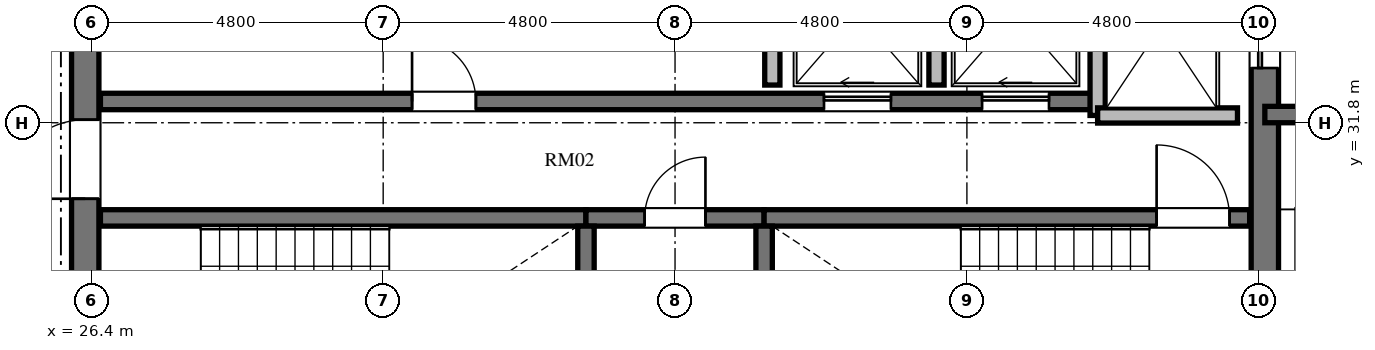
"""IFC4 building model, lengths in metres.
Left out: names, types, materials, properties, quantities, classifications, styles, units other than length and angle.
Written with IfcOpenShell. Run it as: python <this file> out.ifc"""

import sys

from ifc_helpers import new_model, si_unit, direction, frame, frame_2d, origin, place, context, subcontext, project, spatial, rectangle, extrude, element, fill, save


model = new_model("IFC4")
c1 = context("Model", 3, precision=1e-05, world=origin(), true_north=direction((0.0, 1.0)))
c2 = subcontext(c1, "Body", "Model", "MODEL_VIEW")
j1 = project(units=[si_unit("LENGTHUNIT", "METRE"), si_unit("PLANEANGLEUNIT", "RADIAN")], contexts=[c1])
p1 = place(None, origin())
s1 = spatial("IfcSite", under=j1, at=p1, CompositionType="ELEMENT")
p2 = place(p1, origin())
s2 = spatial("IfcBuilding", under=s1, at=p2, CompositionType="ELEMENT")
p3 = place(p2, frame((0.0, 0.0, 291.504)))
s3 = spatial("IfcBuildingStorey", under=s2, at=p3, CompositionType="ELEMENT", Elevation=291.504)
p4 = place(p3, frame((26.3, 20.95, 0.0), z_axis=(0.0, 0.0, 1.0), x_axis=(0.0, 1.0, 0.0)))
e1 = element("IfcWall", 1, at=p4, inside=s3, PredefinedType="SHEAR", context=c2, shape_type="SweptSolid", body=[
    extrude(rectangle(XDim=14.1, YDim=0.45, at=frame_2d((7.05, 0.0))), origin(), (0.0, 0.0, 1.0), 3.648),
])
p5 = place(p4, frame((6.5, 0.0, 0.0)))
e2 = element("IfcOpeningElement", 2, at=p5, cuts=e1, PredefinedType="OPENING", context=c2, shape_type="SweptSolid", body=[
    extrude(rectangle(XDim=1.2, YDim=2.15, at=frame_2d((0.6, 1.075))), frame((0.0, 0.235, 0.0), z_axis=(0.0, -1.0, 0.0), x_axis=(1.0, 0.0, 0.0)), (0.0, 0.0, 1.0), 0.47),
])
p6 = place(p4, frame((9.6, 0.0, 0.0)))
e3 = element("IfcOpeningElement", 3, at=p6, cuts=e1, PredefinedType="OPENING", context=c2, shape_type="SweptSolid", body=[
    extrude(rectangle(XDim=1.3, YDim=2.2, at=frame_2d((0.65, 1.1))), frame((0.0, 0.235, 0.0), z_axis=(0.0, -1.0, 0.0), x_axis=(1.0, 0.0, 0.0)), (0.0, 0.0, 1.0), 0.47),
])
p7 = place(p4, frame((3.26, 0.0, 0.0)))
e4 = element("IfcOpeningElement", 4, at=p7, cuts=e1, PredefinedType="OPENING", context=c2, shape_type="SweptSolid", body=[
    extrude(rectangle(XDim=1.3, YDim=2.2, at=frame_2d((0.65, 1.1))), frame((0.0, 0.235, 0.0), z_axis=(0.0, -1.0, 0.0), x_axis=(1.0, 0.0, 0.0)), (0.0, 0.0, 1.0), 0.47),
])
p8 = place(p3, frame((45.7, 20.95, 0.0), z_axis=(0.0, 0.0, 1.0), x_axis=(0.0, 1.0, 0.0)))
e5 = element("IfcWall", 5, at=p8, inside=s3, PredefinedType="SHEAR", context=c2, shape_type="SweptSolid", body=[
    extrude(rectangle(XDim=14.1, YDim=0.45, at=frame_2d((7.05, 0.0))), origin(), (0.0, 0.0, 1.0), 3.648),
])
p9 = place(p8, frame((11.75, 0.0, 0.0)))
e6 = element("IfcOpeningElement", 6, at=p9, cuts=e5, PredefinedType="OPENING", context=c2, shape_type="SweptSolid", body=[
    extrude(rectangle(XDim=1.4, YDim=2.3, at=frame_2d((0.7, 1.15))), frame((0.0, 0.235, 0.0), z_axis=(0.0, -1.0, 0.0), x_axis=(1.0, 0.0, 0.0)), (0.0, 0.0, 1.0), 0.47),
])
p10 = place(p8, frame((0.95, 0.0, 0.0)))
e7 = element("IfcOpeningElement", 7, at=p10, cuts=e5, PredefinedType="OPENING", context=c2, shape_type="SweptSolid", body=[
    extrude(rectangle(XDim=1.4, YDim=2.3, at=frame_2d((0.7, 1.15))), frame((0.0, 0.235, 0.0), z_axis=(0.0, -1.0, 0.0), x_axis=(1.0, 0.0, 0.0)), (0.0, 0.0, 1.0), 0.47),
])
p11 = place(p3, frame((26.55, 30.235, 0.0), z_axis=(0.0, 0.0, 1.0), x_axis=(1.0, 0.0, 0.0)))
e8 = element("IfcWall", 8, at=p11, inside=s3, PredefinedType="SHEAR", context=c2, shape_type="SweptSolid", body=[
    extrude(rectangle(XDim=7.985, YDim=0.27, at=frame_2d((3.992, 0.0))), origin(), (0.0, 0.0, 1.0), 3.648),
])
p12 = place(p3, frame((34.535, 30.235, 0.0), z_axis=(0.0, 0.0, 1.0), x_axis=(1.0, 0.0, 0.0)))
e9 = element("IfcWall", 9, at=p12, inside=s3, PredefinedType="SHEAR", context=c2, shape_type="SweptSolid", body=[
    extrude(rectangle(XDim=2.93, YDim=0.27, at=frame_2d((1.465, 0.0))), origin(), (0.0, 0.0, 1.0), 3.648),
])
p13 = place(p12, frame((0.965, 0.0, 0.0)))
e10 = element("IfcOpeningElement", 10, at=p13, cuts=e9, PredefinedType="OPENING", context=c2, shape_type="SweptSolid", body=[
    extrude(rectangle(XDim=1.0, YDim=2.1, at=frame_2d((0.5, 1.05))), frame((0.0, 0.145, 0.0), z_axis=(0.0, -1.0, 0.0), x_axis=(1.0, 0.0, 0.0)), (0.0, 0.0, 1.0), 0.29),
])
p14 = place(p3, frame((37.465, 30.235, 0.0), z_axis=(0.0, 0.0, 1.0), x_axis=(1.0, 0.0, 0.0)))
e11 = element("IfcWall", 11, at=p14, inside=s3, PredefinedType="SHEAR", context=c2, shape_type="SweptSolid", body=[
    extrude(rectangle(XDim=7.985, YDim=0.27, at=frame_2d((3.992, 0.0))), origin(), (0.0, 0.0, 1.0), 3.648),
])
p15 = place(p14, frame((6.455, 0.0, 0.0)))
e12 = element("IfcOpeningElement", 12, at=p15, cuts=e11, PredefinedType="OPENING", context=c2, shape_type="SweptSolid", body=[
    extrude(rectangle(XDim=1.2, YDim=2.15, at=frame_2d((0.6, 1.075))), frame((0.0, 0.145, 0.0), z_axis=(0.0, -1.0, 0.0), x_axis=(1.0, 0.0, 0.0)), (0.0, 0.0, 1.0), 0.29),
])
for number, where, z_axis, x_axis in (
    (13, (34.535, 26.02, 0.0), (0.0, 0.0, 1.0), (0.0, 1.0, 0.0)),
    (14, (37.465, 26.02, 0.0), (0.0, 0.0, 1.0), (0.0, 1.0, 0.0)),
):
    element("IfcWall", number, at=place(p3, frame(where, z_axis=z_axis, x_axis=x_axis)), inside=s3, PredefinedType="SHEAR", context=c2, shape_type="SweptSolid", body=[
        extrude(rectangle(XDim=4.08, YDim=0.27, at=frame_2d((2.04, 0.0))), origin(), (0.0, 0.0, 1.0), 3.648),
    ])
p16 = place(p3, frame((26.55, 32.15, 0.0), z_axis=(0.0, 0.0, 1.0), x_axis=(1.0, 0.0, 0.0)))
e15 = element("IfcWall", 15, at=p16, inside=s3, PredefinedType="SHEAR", context=c2, shape_type="SweptSolid", body=[
    extrude(rectangle(XDim=16.4, YDim=0.27, at=frame_2d((8.2, 0.0))), origin(), (0.0, 0.0, 1.0), 3.648),
])
p17 = place(p16, frame((5.125, 0.0, 0.0)))
e16 = element("IfcOpeningElement", 16, at=p17, cuts=e15, PredefinedType="OPENING", context=c2, shape_type="SweptSolid", body=[
    extrude(rectangle(XDim=1.05, YDim=2.15, at=frame_2d((0.525, 1.075))), frame((0.0, 0.145, 0.0), z_axis=(0.0, -1.0, 0.0), x_axis=(1.0, 0.0, 0.0)), (0.0, 0.0, 1.0), 0.29),
])
p18 = place(p16, frame((11.9, 0.0, 0.0)))
e17 = element("IfcOpeningElement", 17, at=p18, cuts=e15, PredefinedType="OPENING", context=c2, shape_type="SweptSolid", body=[
    extrude(rectangle(XDim=1.1, YDim=2.2, at=frame_2d((0.55, 1.1))), frame((0.0, 0.145, 0.0), z_axis=(0.0, -1.0, 0.0), x_axis=(1.0, 0.0, 0.0)), (0.0, 0.0, 1.0), 0.29),
])
p19 = place(p16, frame((14.5, 0.0, 0.0)))
e18 = element("IfcOpeningElement", 18, at=p19, cuts=e15, PredefinedType="OPENING", context=c2, shape_type="SweptSolid", body=[
    extrude(rectangle(XDim=1.1, YDim=2.2, at=frame_2d((0.55, 1.1))), frame((0.0, 0.145, 0.0), z_axis=(0.0, -1.0, 0.0), x_axis=(1.0, 0.0, 0.0)), (0.0, 0.0, 1.0), 0.29),
])
p20 = place(p3, frame((42.95, 31.92, 0.0), z_axis=(0.0, 0.0, 1.0), x_axis=(0.0, 1.0, 0.0)))
e19 = element("IfcWall", 19, at=p20, inside=s3, PredefinedType="SOLIDWALL", context=c2, shape_type="SweptSolid", body=[
    extrude(rectangle(XDim=3.18, YDim=0.25, at=frame_2d((1.59, 0.0))), origin(), (0.0, 0.0, 1.0), 3.448),
])
p21 = place(p3, frame((42.95, 31.92, 0.0), z_axis=(0.0, 0.0, 1.0), x_axis=(1.0, 0.0, 0.0)))
e20 = element("IfcWall", 20, at=p21, inside=s3, PredefinedType="SOLIDWALL", context=c2, shape_type="SweptSolid", body=[
    extrude(rectangle(XDim=2.3, YDim=0.25, at=frame_2d((1.15, 0.0))), origin(), (0.0, 0.0, 1.0), 3.448),
])
for number, where, z_axis, x_axis in (
    (21, (37.6, 32.42, 0.0), (0.0, 0.0, 1.0), (0.0, 1.0, 0.0)),
    (22, (40.3, 32.42, 0.0), (0.0, 0.0, 1.0), (0.0, 1.0, 0.0)),
):
    element("IfcWall", number, at=place(p3, frame(where, z_axis=z_axis, x_axis=x_axis)), inside=s3, PredefinedType="SOLIDWALL", context=c2, shape_type="SweptSolid", body=[
        extrude(rectangle(XDim=2.68, YDim=0.25, at=frame_2d((1.34, 0.0))), origin(), (0.0, 0.0, 1.0), 3.448),
    ])
p22 = place(p3, frame((45.7, 31.935, 0.0), z_axis=(0.0, 0.0, 1.0), x_axis=(1.0, 0.0, 0.0)))
e23 = element("IfcWall", 23, at=p22, inside=s3, PredefinedType="SHEAR", context=c2, shape_type="SweptSolid", body=[
    extrude(rectangle(XDim=4.715, YDim=0.27, at=frame_2d((2.357, 0.0))), origin(), (0.0, 0.0, 1.0), 3.648),
])
p23 = place(p15, origin())
e24 = element("IfcDoor", 24, at=p23, inside=s3, OperationType="SINGLE_SWING_LEFT", PredefinedType="DOOR", context=c2, shape_type="SweptSolid", body=[
    extrude(rectangle(XDim=1.2, YDim=2.15, at=frame_2d((0.6, 1.075))), frame((0.0, 0.025, 0.0), z_axis=(0.0, -1.0, 0.0), x_axis=(1.0, 0.0, 0.0)), (0.0, 0.0, 1.0), 0.05),
])
fill(e12, e24)
p24 = place(p13, origin())
e25 = element("IfcDoor", 25, at=p24, inside=s3, OperationType="SINGLE_SWING_RIGHT", PredefinedType="DOOR", context=c2, shape_type="SweptSolid", body=[
    extrude(rectangle(XDim=1.0, YDim=2.1, at=frame_2d((0.5, 1.05))), frame((0.0, 0.025, 0.0), z_axis=(0.0, -1.0, 0.0), x_axis=(1.0, 0.0, 0.0)), (0.0, 0.0, 1.0), 0.05),
])
fill(e10, e25)
p25 = place(p6, origin())
e26 = element("IfcDoor", 26, at=p25, inside=s3, OperationType="SINGLE_SWING_LEFT", PredefinedType="DOOR", context=c2, shape_type="SweptSolid", body=[
    extrude(rectangle(XDim=1.3, YDim=2.2, at=frame_2d((0.65, 1.1))), frame((0.0, 0.025, 0.0), z_axis=(0.0, -1.0, 0.0), x_axis=(1.0, 0.0, 0.0)), (0.0, 0.0, 1.0), 0.05),
])
fill(e3, e26)
p26 = place(p17, origin())
e27 = element("IfcDoor", 27, at=p26, inside=s3, OperationType="SINGLE_SWING_LEFT", PredefinedType="DOOR", context=c2, shape_type="SweptSolid", body=[
    extrude(rectangle(XDim=1.05, YDim=2.15, at=frame_2d((0.525, 1.075))), frame((0.0, 0.025, 0.0), z_axis=(0.0, -1.0, 0.0), x_axis=(1.0, 0.0, 0.0)), (0.0, 0.0, 1.0), 0.05),
])
fill(e16, e27)
p27 = place(p18, origin())
e28 = element("IfcDoor", 28, at=p27, inside=s3, OperationType="SLIDING_TO_LEFT", PredefinedType="DOOR", context=c2, shape_type="SweptSolid", body=[
    extrude(rectangle(XDim=1.1, YDim=2.2, at=frame_2d((0.55, 1.1))), frame((0.0, 0.025, 0.0), z_axis=(0.0, -1.0, 0.0), x_axis=(1.0, 0.0, 0.0)), (0.0, 0.0, 1.0), 0.05),
])
fill(e17, e28)
p28 = place(p19, origin())
e29 = element("IfcDoor", 29, at=p28, inside=s3, OperationType="SLIDING_TO_LEFT", PredefinedType="DOOR", context=c2, shape_type="SweptSolid", body=[
    extrude(rectangle(XDim=1.1, YDim=2.2, at=frame_2d((0.55, 1.1))), frame((0.0, 0.025, 0.0), z_axis=(0.0, -1.0, 0.0), x_axis=(1.0, 0.0, 0.0)), (0.0, 0.0, 1.0), 0.05),
])
fill(e18, e29)
p29 = place(p9, origin())
e30 = element("IfcDoor", 30, at=p29, inside=s3, OperationType="SLIDING_TO_LEFT", PredefinedType="DOOR", context=c2, shape_type="SweptSolid", body=[
    extrude(rectangle(XDim=1.4, YDim=2.3, at=frame_2d((0.7, 1.15))), frame((0.0, 0.025, 0.0), z_axis=(0.0, -1.0, 0.0), x_axis=(1.0, 0.0, 0.0)), (0.0, 0.0, 1.0), 0.05),
])
fill(e6, e30)
save(model, sys.argv[1])
